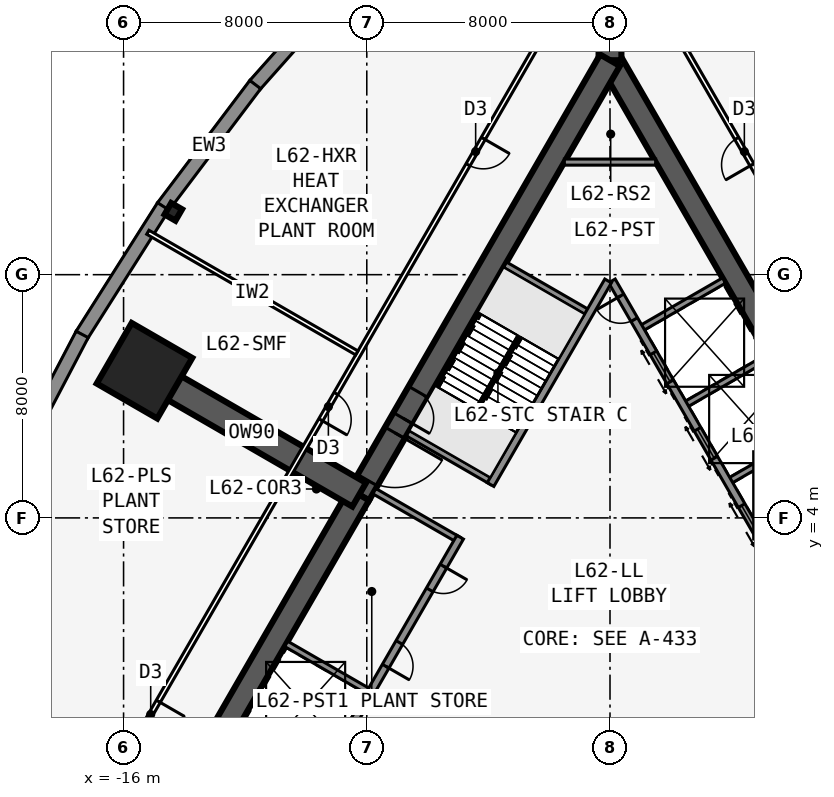
"""IFC4 building model, lengths in metres.
Left out: names, types, materials, properties, quantities, classifications, styles, units other than length and angle.
Written with IfcOpenShell. Run it as: python <this file> out.ifc"""

import sys

from ifc_helpers import new_model, si_unit, direction, frame, frame_2d, origin, origin_2d, place, context, subcontext, project, spatial, polyline, rectangle, i_section, outline, extrude, element, fill, save


model = new_model("IFC4")
c1 = context("Model", 3, precision=1e-05, world=origin(), true_north=direction((0.0, 1.0)))
c2 = subcontext(c1, "Body", "Model", "MODEL_VIEW")
j1 = project(units=[si_unit("LENGTHUNIT", "METRE"), si_unit("PLANEANGLEUNIT", "RADIAN")], contexts=[c1])
p1 = place(None, origin())
s1 = spatial("IfcSite", under=j1, at=p1, CompositionType="ELEMENT")
p2 = place(p1, origin())
s2 = spatial("IfcBuilding", under=s1, at=p2, CompositionType="ELEMENT")
p3 = place(p2, frame((0.0, 0.0, 233.3)))
s3 = spatial("IfcBuildingStorey", under=s2, at=p3, CompositionType="ELEMENT", Elevation=233.3)
p4 = place(p3, frame((8.25, 4.763, 0.0), z_axis=(0.0, 0.0, 1.0), x_axis=(-0.500002952946, 0.866023698893, 0.0)))
e1 = element("IfcWall", 1, at=p4, inside=s3, PredefinedType="SHEAR", context=c2, shape_type="SweptSolid", body=[
    extrude(rectangle(XDim=16.5, YDim=0.75, at=frame_2d((8.25, 0.0))), origin(), (0.0, 0.0, 1.0), 6.0),
])
p5 = place(p3, frame((5.379, 2.586, 0.0), z_axis=(0.0, 0.0, 1.0), x_axis=(-0.500001375892, 0.866024609411, 0.0)))
e2 = element("IfcWall", 2, at=p5, inside=s3, PredefinedType="SOLIDWALL", context=c2, shape_type="SweptSolid", body=[
    extrude(rectangle(XDim=10.633, YDim=0.25, at=frame_2d((5.316, 0.0))), origin(), (0.0, 0.0, 1.0), 5.75),
])
p6 = place(p5, frame((9.164, 0.0, 0.0)))
e3 = element("IfcOpeningElement", 3, at=p6, cuts=e2, PredefinedType="OPENING", context=c2, shape_type="SweptSolid", body=[
    extrude(rectangle(XDim=0.9, YDim=2.13, at=frame_2d((0.45, 1.065))), frame((0.0, 0.135, 0.0), z_axis=(0.0, -1.0, 0.0), x_axis=(1.0, 0.0, 0.0)), (0.0, 0.0, 1.0), 0.27),
])
p7 = place(p5, frame((1.0, 0.0, 0.0)))
e4 = element("IfcOpeningElement", 4, at=p7, cuts=e2, PredefinedType="OPENING", context=c2, shape_type="SweptSolid", body=[
    extrude(rectangle(XDim=1.1, YDim=2.13, at=frame_2d((0.55, 1.065))), frame((0.0, 0.135, 0.0), z_axis=(0.0, -1.0, 0.0), x_axis=(1.0, 0.0, 0.0)), (0.0, 0.0, 1.0), 0.27),
])
p8 = place(p5, frame((3.9, 0.0, 0.0)))
e5 = element("IfcOpeningElement", 5, at=p8, cuts=e2, PredefinedType="OPENING", context=c2, shape_type="SweptSolid", body=[
    extrude(rectangle(XDim=1.1, YDim=2.13, at=frame_2d((0.55, 1.065))), frame((0.0, 0.135, 0.0), z_axis=(0.0, -1.0, 0.0), x_axis=(1.0, 0.0, 0.0)), (0.0, 0.0, 1.0), 0.27),
])
p9 = place(p5, frame((6.8, 0.0, 0.0)))
e6 = element("IfcOpeningElement", 6, at=p9, cuts=e2, PredefinedType="OPENING", context=c2, shape_type="SweptSolid", body=[
    extrude(rectangle(XDim=1.1, YDim=2.13, at=frame_2d((0.55, 1.065))), frame((0.0, 0.135, 0.0), z_axis=(0.0, -1.0, 0.0), x_axis=(1.0, 0.0, 0.0)), (0.0, 0.0, 1.0), 0.27),
])
for number, where, z_axis, x_axis in (
    (7, (3.879, 5.184, 0.0), (0.0, 0.0, 1.0), (0.866, 0.5, 0.0)),
    (8, (2.429, 7.696, 0.0), (0.0, 0.0, 1.0), (0.866, 0.5, 0.0)),
    (9, (0.979, 10.207, 0.0), (0.0, 0.0, 1.0), (0.866, 0.5, 0.0)),
):
    element("IfcWall", number, at=place(p3, frame(where, z_axis=z_axis, x_axis=x_axis)), inside=s3, PredefinedType="SOLIDWALL", context=c2, shape_type="SweptSolid", body=[
        extrude(rectangle(XDim=3.2, YDim=0.2, at=frame_2d((1.6, 0.0))), origin(), (0.0, 0.0, 1.0), 5.75),
    ])
p10 = place(p3, frame((0.0, 19.052, 0.0), z_axis=(0.0, 0.0, 1.0), x_axis=(-0.500002952946, -0.866023698893, 0.0)))
e10 = element("IfcWall", 10, at=p10, inside=s3, PredefinedType="SHEAR", context=c2, shape_type="SweptSolid", body=[
    extrude(rectangle(XDim=16.5, YDim=0.75, at=frame_2d((8.25, 0.0))), origin(), (0.0, 0.0, 1.0), 6.0),
])
p11 = place(p10, frame((14.15, 0.0, 0.0)))
e11 = element("IfcOpeningElement", 11, at=p11, cuts=e10, PredefinedType="OPENING", context=c2, shape_type="SweptSolid", body=[
    extrude(rectangle(XDim=1.8, YDim=2.13, at=frame_2d((0.9, 1.065))), frame((0.0, 0.385, 0.0), z_axis=(0.0, -1.0, 0.0), x_axis=(1.0, 0.0, 0.0)), (0.0, 0.0, 1.0), 0.77),
])
p12 = place(p10, frame((12.6, 0.0, 0.0)))
e12 = element("IfcOpeningElement", 12, at=p12, cuts=e10, PredefinedType="OPENING", context=c2, shape_type="SweptSolid", body=[
    extrude(rectangle(XDim=1.0, YDim=2.13, at=frame_2d((0.5, 1.065))), frame((0.0, 0.385, 0.0), z_axis=(0.0, -1.0, 0.0), x_axis=(1.0, 0.0, 0.0)), (0.0, 0.0, 1.0), 0.77),
])
p13 = place(p3, frame((-8.25, 4.763, 0.0), z_axis=(0.0, 0.0, 1.0), x_axis=(-0.499996545922, -0.866027397988, 0.0)))
e13 = element("IfcWall", 13, at=p13, inside=s3, PredefinedType="SHEAR", context=c2, shape_type="SweptSolid", body=[
    extrude(rectangle(XDim=16.5, YDim=0.75, at=frame_2d((8.25, 0.0))), origin(), (0.0, 0.0, 1.0), 6.0),
])
p14 = place(p3, frame((-0.062, 11.794, 0.0), z_axis=(0.0, 0.0, 1.0), x_axis=(-0.500006680225, -0.86602154692, 0.0)))
e14 = element("IfcWall", 14, at=p14, inside=s3, PredefinedType="SOLIDWALL", context=c2, shape_type="SweptSolid", body=[
    extrude(rectangle(XDim=7.733, YDim=0.25, at=frame_2d((3.866, 0.0))), origin(), (0.0, 0.0, 1.0), 5.75),
])
p15 = place(p3, frame((-4.929, 3.365, 0.0), z_axis=(0.0, 0.0, 1.0), x_axis=(-0.499991433582, -0.866030349552, 0.0)))
e15 = element("IfcWall", 15, at=p15, inside=s3, PredefinedType="SOLIDWALL", context=c2, shape_type="SweptSolid", body=[
    extrude(rectangle(XDim=10.633, YDim=0.25, at=frame_2d((5.316, 0.0))), origin(), (0.0, 0.0, 1.0), 5.75),
])
p16 = place(p15, frame((9.164, 0.0, 0.0)))
e16 = element("IfcOpeningElement", 16, at=p16, cuts=e15, PredefinedType="OPENING", context=c2, shape_type="SweptSolid", body=[
    extrude(rectangle(XDim=0.9, YDim=2.13, at=frame_2d((0.45, 1.065))), frame((0.0, 0.135, 0.0), z_axis=(0.0, -1.0, 0.0), x_axis=(1.0, 0.0, 0.0)), (0.0, 0.0, 1.0), 0.27),
])
p17 = place(p15, frame((1.1, 0.0, 0.0)))
e17 = element("IfcOpeningElement", 17, at=p17, cuts=e15, PredefinedType="OPENING", context=c2, shape_type="SweptSolid", body=[
    extrude(rectangle(XDim=0.9, YDim=2.13, at=frame_2d((0.45, 1.065))), frame((0.0, 0.135, 0.0), z_axis=(0.0, -1.0, 0.0), x_axis=(1.0, 0.0, 0.0)), (0.0, 0.0, 1.0), 0.27),
])
p18 = place(p15, frame((4.0, 0.0, 0.0)))
e18 = element("IfcOpeningElement", 18, at=p18, cuts=e15, PredefinedType="OPENING", context=c2, shape_type="SweptSolid", body=[
    extrude(rectangle(XDim=0.9, YDim=2.13, at=frame_2d((0.45, 1.065))), frame((0.0, 0.135, 0.0), z_axis=(0.0, -1.0, 0.0), x_axis=(1.0, 0.0, 0.0)), (0.0, 0.0, 1.0), 0.27),
])
for number, where, z_axis, x_axis in (
    (19, (-0.679, 10.727, 0.0), (0.0, 0.0, 1.0), (-0.866, 0.5, 0.0)),
    (20, (-3.879, 5.184, 0.0), (0.0, 0.0, 1.0), (-0.866, 0.5, 0.0)),
    (21, (-4.979, 3.279, 0.0), (0.0, 0.0, 1.0), (-0.866, 0.5, 0.0)),
    (22, (-7.879, -1.744, 0.0), (0.0, 0.0, 1.0), (-0.866, 0.5, 0.0)),
):
    element("IfcWall", number, at=place(p3, frame(where, z_axis=z_axis, x_axis=x_axis)), inside=s3, PredefinedType="SOLIDWALL", context=c2, shape_type="SweptSolid", body=[
        extrude(rectangle(XDim=3.2, YDim=0.2, at=frame_2d((1.6, 0.0))), origin(), (0.0, 0.0, 1.0), 5.75),
    ])
p19 = place(p3, frame((0.0, 19.052, 0.0), z_axis=(0.0, 0.0, 1.0), x_axis=(0.0, 1.0, 0.0)))
e23 = element("IfcWall", 23, at=p19, inside=s3, PredefinedType="SHEAR", context=c2, shape_type="SweptSolid", body=[
    extrude(rectangle(XDim=4.746, YDim=0.75, at=frame_2d((2.373, 0.0))), origin(), (0.0, 0.0, 1.0), 6.0),
])
p20 = place(p19, frame((1.725, 0.0, 0.0)))
e24 = element("IfcOpeningElement", 24, at=p20, cuts=e23, PredefinedType="OPENING", context=c2, shape_type="SweptSolid", body=[
    extrude(rectangle(XDim=1.8, YDim=2.13, at=frame_2d((0.9, 1.065))), frame((0.0, 0.385, 0.0), z_axis=(0.0, -1.0, 0.0), x_axis=(1.0, 0.0, 0.0)), (0.0, 0.0, 1.0), 0.77),
])
p21 = place(p3, frame((-8.25, 4.763, 0.0), z_axis=(0.0, 0.0, 1.0), x_axis=(-0.866023543838, 0.500003221507, 0.0)))
e25 = element("IfcWall", 25, at=p21, inside=s3, PredefinedType="SHEAR", context=c2, shape_type="SweptSolid", body=[
    extrude(rectangle(XDim=8.154, YDim=0.9, at=frame_2d((4.077, 0.0))), origin(), (0.0, 0.0, 1.0), 6.0),
])
p22 = place(p3, frame((-14.363, 14.066, 0.0), z_axis=(0.0, 0.0, 1.0), x_axis=(-0.866025403784, 0.5, 0.0)))
e26 = element("IfcColumn", 26, at=p22, inside=s3, PredefinedType="COLUMN", context=c2, shape_type="SweptSolid", body=[
    extrude(i_section(OverallWidth=0.411, OverallDepth=0.434, WebThickness=0.036, FlangeThickness=0.057, at=origin_2d()), origin(), (0.0, 0.0, 1.0), 6.0),
])
p23 = place(p3, frame((-15.312, 8.84, 0.0), z_axis=(0.0, 0.0, 1.0), x_axis=(-0.866025403784, 0.5, 0.0)))
e27 = element("IfcColumn", 27, at=p23, inside=s3, PredefinedType="COLUMN", context=c2, shape_type="SweptSolid", body=[
    extrude(rectangle(XDim=2.3, YDim=2.3, at=origin_2d()), origin(), (0.0, 0.0, 1.0), 6.0),
])
p24 = place(p3, frame((-8.288, 22.053, 0.0), z_axis=(0.0, 0.0, 1.0), x_axis=(-0.664375712375, -0.747398764253, 0.0)))
e28 = element("IfcWall", 28, at=p24, inside=s3, PredefinedType="SOLIDWALL", context=c2, shape_type="SweptSolid", body=[
    extrude(outline(polyline([(0.0, 0.0), (5.105, 0.0), (5.105, 5.75), (0.0, 5.75), (0.0, 0.0)]), holes=[polyline([(4.502, 2.875), (4.436, 3.38), (4.241, 3.85), (3.931, 4.254), (3.527, 4.564), (3.057, 4.759), (2.552, 4.825), (2.048, 4.759), (1.577, 4.564), (1.174, 4.254), (0.864, 3.85), (0.669, 3.38), (0.602, 2.875), (0.669, 2.37), (0.864, 1.9), (1.174, 1.496), (1.577, 1.186), (2.048, 0.991), (2.552, 0.925), (3.057, 0.991), (3.527, 1.186), (3.931, 1.496), (4.241, 1.9), (4.436, 2.37), (4.502, 2.875)])]), frame((0.0, 0.225, 0.0), z_axis=(0.0, -1.0, 0.0), x_axis=(1.0, 0.0, 0.0)), (0.0, 0.0, 1.0), 0.45),
])
p25 = place(p3, frame((-11.668, 18.252, 0.0), z_axis=(0.0, 0.0, 1.0), x_axis=(-0.602408653511, -0.798187831388, 0.0)))
e29 = element("IfcWall", 29, at=p25, inside=s3, PredefinedType="SOLIDWALL", context=c2, shape_type="SweptSolid", body=[
    extrude(outline(polyline([(0.0, 0.0), (5.038, 0.0), (5.038, 5.75), (0.0, 5.75), (0.0, 0.0)]), holes=[polyline([(4.419, 2.875), (4.354, 3.367), (4.164, 3.825), (3.863, 4.219), (3.469, 4.52), (3.011, 4.71), (2.519, 4.775), (2.027, 4.71), (1.569, 4.52), (1.176, 4.219), (0.874, 3.825), (0.684, 3.367), (0.619, 2.875), (0.684, 2.383), (0.874, 1.925), (1.176, 1.531), (1.569, 1.229), (2.027, 1.04), (2.519, 0.975), (3.011, 1.04), (3.469, 1.229), (3.863, 1.531), (4.164, 1.925), (4.354, 2.383), (4.419, 2.875)])]), frame((0.0, 0.225, 0.0), z_axis=(0.0, -1.0, 0.0), x_axis=(1.0, 0.0, 0.0)), (0.0, 0.0, 1.0), 0.45),
])
p26 = place(p3, frame((-14.693, 14.246, 0.0), z_axis=(0.0, 0.0, 1.0), x_axis=(-0.535242418236, -0.844698498709, 0.0)))
e30 = element("IfcWall", 30, at=p26, inside=s3, PredefinedType="SOLIDWALL", context=c2, shape_type="SweptSolid", body=[
    extrude(outline(polyline([(0.0, 0.0), (5.004, 0.0), (5.004, 5.75), (0.0, 5.75), (0.0, 0.0)]), holes=[polyline([(4.402, 2.875), (4.337, 3.367), (4.148, 3.825), (3.846, 4.219), (3.452, 4.52), (2.994, 4.71), (2.502, 4.775), (2.01, 4.71), (1.552, 4.52), (1.159, 4.219), (0.857, 3.825), (0.667, 3.367), (0.602, 2.875), (0.667, 2.383), (0.857, 1.925), (1.159, 1.531), (1.552, 1.229), (2.01, 1.04), (2.502, 0.975), (2.994, 1.04), (3.452, 1.229), (3.846, 1.531), (4.148, 1.925), (4.337, 2.383), (4.402, 2.875)])]), frame((0.0, 0.225, 0.0), z_axis=(0.0, -1.0, 0.0), x_axis=(1.0, 0.0, 0.0)), (0.0, 0.0, 1.0), 0.45),
])
p27 = place(p3, frame((-17.362, 10.034, 0.0), z_axis=(0.0, 0.0, 1.0), x_axis=(-0.463976002579, -0.885847768542, 0.0)))
e31 = element("IfcWall", 31, at=p27, inside=s3, PredefinedType="SOLIDWALL", context=c2, shape_type="SweptSolid", body=[
    extrude(outline(polyline([(0.0, 0.0), (5.004, 0.0), (5.004, 5.75), (0.0, 5.75), (0.0, 0.0)]), holes=[polyline([(4.402, 2.875), (4.337, 3.367), (4.147, 3.825), (3.846, 4.219), (3.452, 4.52), (2.994, 4.71), (2.502, 4.775), (2.01, 4.71), (1.552, 4.52), (1.159, 4.219), (0.857, 3.825), (0.667, 3.367), (0.602, 2.875), (0.667, 2.383), (0.857, 1.925), (1.159, 1.531), (1.552, 1.229), (2.01, 1.04), (2.502, 0.975), (2.994, 1.04), (3.452, 1.229), (3.846, 1.531), (4.147, 1.925), (4.337, 2.383), (4.402, 2.875)])]), frame((0.0, 0.225, 0.0), z_axis=(0.0, -1.0, 0.0), x_axis=(1.0, 0.0, 0.0)), (0.0, 0.0, 1.0), 0.45),
])
p28 = place(p3, frame((20.102, -11.115, 0.0), z_axis=(0.0, 0.0, 1.0), x_axis=(-0.500000265775, 0.866025250339, 0.0)))
e32 = element("IfcWall", 32, at=p28, inside=s3, PredefinedType="PARTITIONING", context=c2, shape_type="SweptSolid", body=[
    extrude(rectangle(XDim=39.354, YDim=0.15, at=frame_2d((19.677, 0.0))), origin(), (0.0, 0.0, 1.0), 5.75),
])
p29 = place(p28, frame((9.489, 0.0, 0.0)))
e33 = element("IfcOpeningElement", 33, at=p29, cuts=e32, PredefinedType="OPENING", context=c2, shape_type="SweptSolid", body=[
    extrude(rectangle(XDim=1.0, YDim=2.13, at=frame_2d((0.5, 1.065))), frame((0.0, 0.085, 0.0), z_axis=(0.0, -1.0, 0.0), x_axis=(1.0, 0.0, 0.0)), (0.0, 0.0, 1.0), 0.17),
])
p30 = place(p28, frame((21.177, 0.0, 0.0)))
e34 = element("IfcOpeningElement", 34, at=p30, cuts=e32, PredefinedType="OPENING", context=c2, shape_type="SweptSolid", body=[
    extrude(rectangle(XDim=1.0, YDim=2.13, at=frame_2d((0.5, 1.065))), frame((0.0, 0.085, 0.0), z_axis=(0.0, -1.0, 0.0), x_axis=(1.0, 0.0, 0.0)), (0.0, 0.0, 1.0), 0.17),
])
p31 = place(p28, frame((30.865, 0.0, 0.0)))
e35 = element("IfcOpeningElement", 35, at=p31, cuts=e32, PredefinedType="OPENING", context=c2, shape_type="SweptSolid", body=[
    extrude(rectangle(XDim=1.0, YDim=2.13, at=frame_2d((0.5, 1.065))), frame((0.0, 0.085, 0.0), z_axis=(0.0, -1.0, 0.0), x_axis=(1.0, 0.0, 0.0)), (0.0, 0.0, 1.0), 0.17),
])
p32 = place(p3, frame((-0.425, 22.966, 0.0), z_axis=(0.0, 0.0, 1.0), x_axis=(-0.500000265775, -0.866025250339, 0.0)))
e36 = element("IfcWall", 36, at=p32, inside=s3, PredefinedType="PARTITIONING", context=c2, shape_type="SweptSolid", body=[
    extrude(rectangle(XDim=39.354, YDim=0.15, at=frame_2d((19.677, 0.0))), origin(), (0.0, 0.0, 1.0), 5.75),
])
p33 = place(p32, frame((7.489, 0.0, 0.0)))
e37 = element("IfcOpeningElement", 37, at=p33, cuts=e36, PredefinedType="OPENING", context=c2, shape_type="SweptSolid", body=[
    extrude(rectangle(XDim=1.0, YDim=2.13, at=frame_2d((0.5, 1.065))), frame((0.0, 0.085, 0.0), z_axis=(0.0, -1.0, 0.0), x_axis=(1.0, 0.0, 0.0)), (0.0, 0.0, 1.0), 0.17),
])
p34 = place(p32, frame((17.177, 0.0, 0.0)))
e38 = element("IfcOpeningElement", 38, at=p34, cuts=e36, PredefinedType="OPENING", context=c2, shape_type="SweptSolid", body=[
    extrude(rectangle(XDim=1.0, YDim=2.13, at=frame_2d((0.5, 1.065))), frame((0.0, 0.085, 0.0), z_axis=(0.0, -1.0, 0.0), x_axis=(1.0, 0.0, 0.0)), (0.0, 0.0, 1.0), 0.17),
])
p35 = place(p32, frame((28.865, 0.0, 0.0)))
e39 = element("IfcOpeningElement", 39, at=p35, cuts=e36, PredefinedType="OPENING", context=c2, shape_type="SweptSolid", body=[
    extrude(rectangle(XDim=1.0, YDim=2.13, at=frame_2d((0.5, 1.065))), frame((0.0, 0.085, 0.0), z_axis=(0.0, -1.0, 0.0), x_axis=(1.0, 0.0, 0.0)), (0.0, 0.0, 1.0), 0.17),
])
p36 = place(p3, frame((-8.329, 9.427, 0.0), z_axis=(0.0, 0.0, 1.0), x_axis=(-0.866027296944, 0.499996720937, 0.0)))
e40 = element("IfcWall", 40, at=p36, inside=s3, PredefinedType="PARTITIONING", context=c2, shape_type="SweptSolid", body=[
    extrude(rectangle(XDim=7.937, YDim=0.15, at=frame_2d((3.968, 0.0))), origin(), (0.0, 0.0, 1.0), 5.75),
])
p37 = place(p3, frame((-1.501, 15.703, 0.0), z_axis=(0.0, 0.0, 1.0), x_axis=(1.0, 0.0, 0.0)))
e41 = element("IfcWall", 41, at=p37, inside=s3, PredefinedType="SOLIDWALL", context=c2, shape_type="SweptSolid", body=[
    extrude(rectangle(XDim=3.002, YDim=0.2, at=frame_2d((1.501, 0.0))), origin(), (0.0, 0.0, 1.0), 5.75),
])
p38 = place(p3, frame((-2.988, 9.978, 0.0), z_axis=(0.0, 0.0, 1.0), x_axis=(-0.499992232847, -0.866029888106, 0.0)))
e42 = element("IfcWall", 42, at=p38, inside=s3, PredefinedType="SOLIDWALL", context=c2, shape_type="SweptSolid", body=[
    extrude(rectangle(XDim=2.794, YDim=0.1, at=frame_2d((1.397, 0.0))), origin(), (0.0, 0.0, 1.0), 6.0),
])
p39 = place(p31, origin())
e43 = element("IfcDoor", 43, at=p39, inside=s3, OperationType="SINGLE_SWING_LEFT", PredefinedType="DOOR", context=c2, shape_type="SweptSolid", body=[
    extrude(rectangle(XDim=1.0, YDim=2.13, at=frame_2d((0.5, 1.065))), frame((0.0, 0.025, 0.0), z_axis=(0.0, -1.0, 0.0), x_axis=(1.0, 0.0, 0.0)), (0.0, 0.0, 1.0), 0.05),
])
fill(e35, e43)
p40 = place(p33, origin())
e44 = element("IfcDoor", 44, at=p40, inside=s3, OperationType="SINGLE_SWING_LEFT", PredefinedType="DOOR", context=c2, shape_type="SweptSolid", body=[
    extrude(rectangle(XDim=1.0, YDim=2.13, at=frame_2d((0.5, 1.065))), frame((0.0, 0.025, 0.0), z_axis=(0.0, -1.0, 0.0), x_axis=(1.0, 0.0, 0.0)), (0.0, 0.0, 1.0), 0.05),
])
fill(e37, e44)
p41 = place(p34, origin())
e45 = element("IfcDoor", 45, at=p41, inside=s3, OperationType="SINGLE_SWING_RIGHT", PredefinedType="DOOR", context=c2, shape_type="SweptSolid", body=[
    extrude(rectangle(XDim=1.0, YDim=2.13, at=frame_2d((0.5, 1.065))), frame((0.0, 0.025, 0.0), z_axis=(0.0, -1.0, 0.0), x_axis=(1.0, 0.0, 0.0)), (0.0, 0.0, 1.0), 0.05),
])
fill(e38, e45)
p42 = place(p35, origin())
e46 = element("IfcDoor", 46, at=p42, inside=s3, OperationType="SINGLE_SWING_LEFT", PredefinedType="DOOR", context=c2, shape_type="SweptSolid", body=[
    extrude(rectangle(XDim=1.0, YDim=2.13, at=frame_2d((0.5, 1.065))), frame((0.0, 0.025, 0.0), z_axis=(0.0, -1.0, 0.0), x_axis=(1.0, 0.0, 0.0)), (0.0, 0.0, 1.0), 0.05),
])
fill(e39, e46)
p43 = place(p11, origin())
e47 = element("IfcDoor", 47, at=p43, inside=s3, OperationType="DOUBLE_DOOR_SINGLE_SWING", PredefinedType="DOOR", context=c2, shape_type="SweptSolid", body=[
    extrude(rectangle(XDim=1.8, YDim=2.13, at=frame_2d((0.9, 1.065))), frame((0.0, 0.025, 0.0), z_axis=(0.0, -1.0, 0.0), x_axis=(1.0, 0.0, 0.0)), (0.0, 0.0, 1.0), 0.05),
])
fill(e11, e47)
p44 = place(p12, origin())
e48 = element("IfcDoor", 48, at=p44, inside=s3, OperationType="SINGLE_SWING_RIGHT", PredefinedType="DOOR", context=c2, shape_type="SweptSolid", body=[
    extrude(rectangle(XDim=1.0, YDim=2.13, at=frame_2d((0.5, 1.065))), frame((0.0, 0.025, 0.0), z_axis=(0.0, -1.0, 0.0), x_axis=(1.0, 0.0, 0.0)), (0.0, 0.0, 1.0), 0.05),
])
fill(e12, e48)
p45 = place(p6, origin())
e49 = element("IfcDoor", 49, at=p45, inside=s3, OperationType="SINGLE_SWING_RIGHT", PredefinedType="DOOR", context=c2, shape_type="SweptSolid", body=[
    extrude(rectangle(XDim=0.9, YDim=2.13, at=frame_2d((0.45, 1.065))), frame((0.0, 0.025, 0.0), z_axis=(0.0, -1.0, 0.0), x_axis=(1.0, 0.0, 0.0)), (0.0, 0.0, 1.0), 0.05),
])
fill(e3, e49)
p46 = place(p17, origin())
e50 = element("IfcDoor", 50, at=p46, inside=s3, OperationType="SINGLE_SWING_LEFT", PredefinedType="DOOR", context=c2, shape_type="SweptSolid", body=[
    extrude(rectangle(XDim=0.9, YDim=2.13, at=frame_2d((0.45, 1.065))), frame((0.0, 0.025, 0.0), z_axis=(0.0, -1.0, 0.0), x_axis=(1.0, 0.0, 0.0)), (0.0, 0.0, 1.0), 0.05),
])
fill(e17, e50)
p47 = place(p18, origin())
e51 = element("IfcDoor", 51, at=p47, inside=s3, OperationType="SINGLE_SWING_RIGHT", PredefinedType="DOOR", context=c2, shape_type="SweptSolid", body=[
    extrude(rectangle(XDim=0.9, YDim=2.13, at=frame_2d((0.45, 1.065))), frame((0.0, 0.025, 0.0), z_axis=(0.0, -1.0, 0.0), x_axis=(1.0, 0.0, 0.0)), (0.0, 0.0, 1.0), 0.05),
])
fill(e18, e51)
p48 = place(p7, origin())
e52 = element("IfcDoor", 52, at=p48, inside=s3, OperationType="DOUBLE_DOOR_SLIDING", PredefinedType="USERDEFINED", context=c2, shape_type="SweptSolid", body=[
    extrude(rectangle(XDim=1.1, YDim=2.13, at=frame_2d((0.55, 1.065))), frame((0.0, 0.025, 0.0), z_axis=(0.0, -1.0, 0.0), x_axis=(1.0, 0.0, 0.0)), (0.0, 0.0, 1.0), 0.05),
])
fill(e4, e52)
p49 = place(p8, origin())
e53 = element("IfcDoor", 53, at=p49, inside=s3, OperationType="DOUBLE_DOOR_SLIDING", PredefinedType="USERDEFINED", context=c2, shape_type="SweptSolid", body=[
    extrude(rectangle(XDim=1.1, YDim=2.13, at=frame_2d((0.55, 1.065))), frame((0.0, 0.025, 0.0), z_axis=(0.0, -1.0, 0.0), x_axis=(1.0, 0.0, 0.0)), (0.0, 0.0, 1.0), 0.05),
])
fill(e5, e53)
p50 = place(p9, origin())
e54 = element("IfcDoor", 54, at=p50, inside=s3, OperationType="DOUBLE_DOOR_SLIDING", PredefinedType="USERDEFINED", context=c2, shape_type="SweptSolid", body=[
    extrude(rectangle(XDim=1.1, YDim=2.13, at=frame_2d((0.55, 1.065))), frame((0.0, 0.025, 0.0), z_axis=(0.0, -1.0, 0.0), x_axis=(1.0, 0.0, 0.0)), (0.0, 0.0, 1.0), 0.05),
])
fill(e6, e54)
save(model, sys.argv[1])
